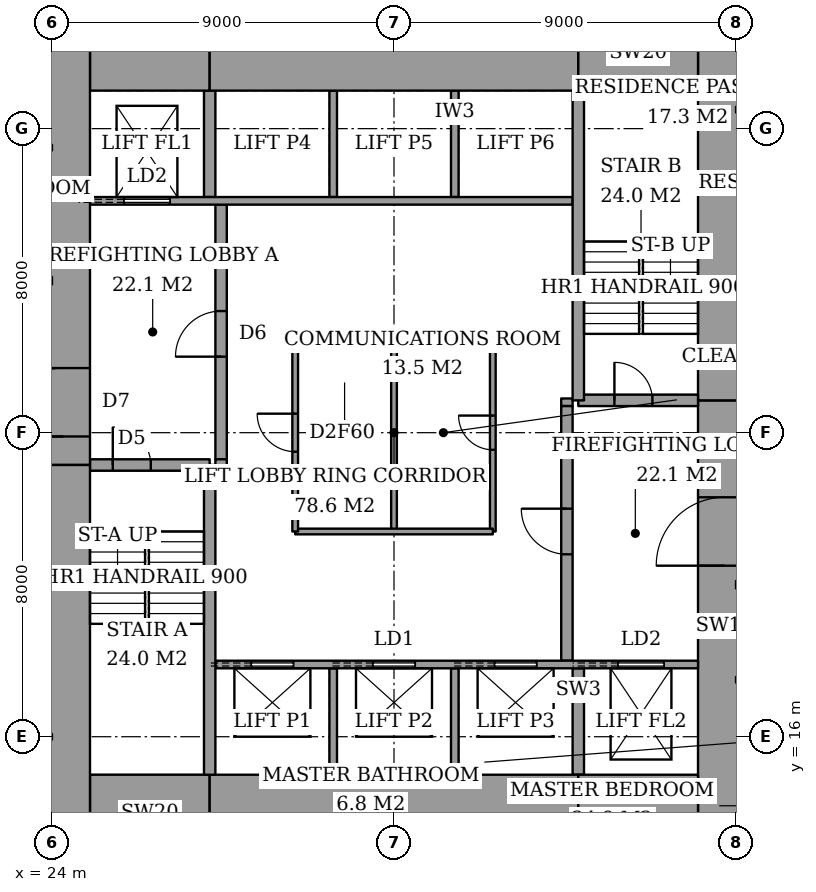
"""IFC4 building model, lengths in metres.
Left out: names, types, materials, properties, quantities, classifications, styles, units other than length and angle.
Written with IfcOpenShell. Run it as: python <this file> out.ifc"""

import sys

from ifc_helpers import new_model, si_unit, direction, frame, frame_2d, origin, place, context, subcontext, project, spatial, rectangle, extrude, element, fill, save


model = new_model("IFC4")
c1 = context("Model", 3, precision=1e-05, world=origin(), true_north=direction((0.0, 1.0)))
c2 = subcontext(c1, "Body", "Model", "MODEL_VIEW")
j1 = project(units=[si_unit("LENGTHUNIT", "METRE"), si_unit("PLANEANGLEUNIT", "RADIAN")], contexts=[c1])
p1 = place(None, origin())
s1 = spatial("IfcSite", under=j1, at=p1, CompositionType="ELEMENT")
p2 = place(p1, origin())
s2 = spatial("IfcBuilding", under=s1, at=p2, CompositionType="ELEMENT")
p3 = place(p2, frame((0.0, 0.0, 125.0)))
s3 = spatial("IfcBuildingStorey", under=s2, at=p3, CompositionType="ELEMENT", Elevation=125.0)
p4 = place(p3, frame((25.0, 14.0, 0.0), z_axis=(0.0, 0.0, 1.0), x_axis=(1.0, 0.0, 0.0)))
e1 = element("IfcWall", 1, at=p4, inside=s3, PredefinedType="SHEAR", context=c2, shape_type="SweptSolid", body=[
    extrude(rectangle(XDim=3.15, YDim=2.0, at=frame_2d((1.575, 0.0))), origin(), (0.0, 0.0, 1.0), 3.6),
])
p5 = place(p3, frame((28.15, 14.0, 0.0), z_axis=(0.0, 0.0, 1.0), x_axis=(1.0, 0.0, 0.0)))
e2 = element("IfcWall", 2, at=p5, inside=s3, PredefinedType="SHEAR", context=c2, shape_type="SweptSolid", body=[
    extrude(rectangle(XDim=9.7, YDim=2.0, at=frame_2d((4.85, 0.0))), origin(), (0.0, 0.0, 1.0), 3.6),
])
for number, where, z_axis, x_axis in (
    (3, (37.85, 14.0, 0.0), (0.0, 0.0, 1.0), (1.0, 0.0, 0.0)),
    (4, (25.0, 34.0, 0.0), (0.0, 0.0, 1.0), (1.0, 0.0, 0.0)),
):
    element("IfcWall", number, at=place(p3, frame(where, z_axis=z_axis, x_axis=x_axis)), inside=s3, PredefinedType="SHEAR", context=c2, shape_type="SweptSolid", body=[
        extrude(rectangle(XDim=3.15, YDim=2.0, at=frame_2d((1.575, 0.0))), origin(), (0.0, 0.0, 1.0), 3.6),
    ])
p6 = place(p3, frame((28.15, 34.0, 0.0), z_axis=(0.0, 0.0, 1.0), x_axis=(1.0, 0.0, 0.0)))
e5 = element("IfcWall", 5, at=p6, inside=s3, PredefinedType="SHEAR", context=c2, shape_type="SweptSolid", body=[
    extrude(rectangle(XDim=9.7, YDim=2.0, at=frame_2d((4.85, 0.0))), origin(), (0.0, 0.0, 1.0), 3.6),
])
p7 = place(p3, frame((37.85, 34.0, 0.0), z_axis=(0.0, 0.0, 1.0), x_axis=(1.0, 0.0, 0.0)))
e6 = element("IfcWall", 6, at=p7, inside=s3, PredefinedType="SHEAR", context=c2, shape_type="SweptSolid", body=[
    extrude(rectangle(XDim=3.15, YDim=2.0, at=frame_2d((1.575, 0.0))), origin(), (0.0, 0.0, 1.0), 3.6),
])
p8 = place(p3, frame((24.3, 13.0, 0.0), z_axis=(0.0, 0.0, 1.0), x_axis=(0.0, 1.0, 0.0)))
e7 = element("IfcWall", 7, at=p8, inside=s3, PredefinedType="SHEAR", context=c2, shape_type="SweptSolid", body=[
    extrude(rectangle(XDim=10.15, YDim=1.4, at=frame_2d((5.075, 0.0))), origin(), (0.0, 0.0, 1.0), 3.6),
])
p9 = place(p3, frame((24.3, 23.15, 0.0), z_axis=(0.0, 0.0, 1.0), x_axis=(0.0, 1.0, 0.0)))
e8 = element("IfcWall", 8, at=p9, inside=s3, PredefinedType="SHEAR", context=c2, shape_type="SweptSolid", body=[
    extrude(rectangle(XDim=11.85, YDim=1.4, at=frame_2d((5.925, 0.0))), origin(), (0.0, 0.0, 1.0), 3.6),
])
p10 = place(p9, frame((0.75, 0.0, 0.0)))
e9 = element("IfcOpeningElement", 9, at=p10, cuts=e8, PredefinedType="OPENING", context=c2, shape_type="SweptSolid", body=[
    extrude(rectangle(XDim=1.8, YDim=2.4, at=frame_2d((0.9, 1.2))), frame((0.0, 0.71, 0.0), z_axis=(0.0, -1.0, 0.0), x_axis=(1.0, 0.0, 0.0)), (0.0, 0.0, 1.0), 1.42),
])
p11 = place(p3, frame((41.7, 13.0, 0.0), z_axis=(0.0, 0.0, 1.0), x_axis=(0.0, 1.0, 0.0)))
e10 = element("IfcWall", 10, at=p11, inside=s3, PredefinedType="SHEAR", context=c2, shape_type="SweptSolid", body=[
    extrude(rectangle(XDim=11.85, YDim=1.4, at=frame_2d((5.925, 0.0))), origin(), (0.0, 0.0, 1.0), 3.6),
])
p12 = place(p11, frame((7.5, 0.0, 0.0)))
e11 = element("IfcOpeningElement", 11, at=p12, cuts=e10, PredefinedType="OPENING", context=c2, shape_type="SweptSolid", body=[
    extrude(rectangle(XDim=1.8, YDim=2.4, at=frame_2d((0.9, 1.2))), frame((0.0, 0.71, 0.0), z_axis=(0.0, -1.0, 0.0), x_axis=(1.0, 0.0, 0.0)), (0.0, 0.0, 1.0), 1.42),
])
p13 = place(p3, frame((41.7, 24.85, 0.0), z_axis=(0.0, 0.0, 1.0), x_axis=(0.0, 1.0, 0.0)))
e12 = element("IfcWall", 12, at=p13, inside=s3, PredefinedType="SHEAR", context=c2, shape_type="SweptSolid", body=[
    extrude(rectangle(XDim=10.15, YDim=1.4, at=frame_2d((5.075, 0.0))), origin(), (0.0, 0.0, 1.0), 3.6),
])
p14 = place(p3, frame((28.15, 15.0, 0.0), z_axis=(0.0, 0.0, 1.0), x_axis=(0.0, 1.0, 0.0)))
e13 = element("IfcWall", 13, at=p14, inside=s3, PredefinedType="SHEAR", context=c2, shape_type="SweptSolid", body=[
    extrude(rectangle(XDim=8.15, YDim=0.3, at=frame_2d((4.075, 0.0))), origin(), (0.0, 0.0, 1.0), 3.6),
])
p15 = place(p3, frame((25.0, 23.15, 0.0), z_axis=(0.0, 0.0, 1.0), x_axis=(1.0, 0.0, 0.0)))
e14 = element("IfcWall", 14, at=p15, inside=s3, PredefinedType="SHEAR", context=c2, shape_type="SweptSolid", body=[
    extrude(rectangle(XDim=3.15, YDim=0.3, at=frame_2d((1.575, 0.0))), origin(), (0.0, 0.0, 1.0), 3.6),
])
p16 = place(p15, frame((0.6, 0.0, 0.0)))
e15 = element("IfcOpeningElement", 15, at=p16, cuts=e14, PredefinedType="OPENING", context=c2, shape_type="SweptSolid", body=[
    extrude(rectangle(XDim=1.0, YDim=2.1, at=frame_2d((0.5, 1.05))), frame((0.0, 0.16, 0.0), z_axis=(0.0, -1.0, 0.0), x_axis=(1.0, 0.0, 0.0)), (0.0, 0.0, 1.0), 0.32),
])
p17 = place(p3, frame((37.85, 24.85, 0.0), z_axis=(0.0, 0.0, 1.0), x_axis=(0.0, 1.0, 0.0)))
e16 = element("IfcWall", 16, at=p17, inside=s3, PredefinedType="SHEAR", context=c2, shape_type="SweptSolid", body=[
    extrude(rectangle(XDim=8.15, YDim=0.3, at=frame_2d((4.075, 0.0))), origin(), (0.0, 0.0, 1.0), 3.6),
])
p18 = place(p3, frame((37.85, 24.85, 0.0), z_axis=(0.0, 0.0, 1.0), x_axis=(1.0, 0.0, 0.0)))
e17 = element("IfcWall", 17, at=p18, inside=s3, PredefinedType="SHEAR", context=c2, shape_type="SweptSolid", body=[
    extrude(rectangle(XDim=3.15, YDim=0.3, at=frame_2d((1.575, 0.0))), origin(), (0.0, 0.0, 1.0), 3.6),
])
p19 = place(p18, frame((0.95, 0.0, 0.0)))
e18 = element("IfcOpeningElement", 18, at=p19, cuts=e17, PredefinedType="OPENING", context=c2, shape_type="SweptSolid", body=[
    extrude(rectangle(XDim=1.0, YDim=2.1, at=frame_2d((0.5, 1.05))), frame((0.0, 0.16, 0.0), z_axis=(0.0, -1.0, 0.0), x_axis=(1.0, 0.0, 0.0)), (0.0, 0.0, 1.0), 0.32),
])
p20 = place(p3, frame((28.45, 23.3, 0.0), z_axis=(0.0, 0.0, 1.0), x_axis=(0.0, 1.0, 0.0)))
e19 = element("IfcWall", 19, at=p20, inside=s3, PredefinedType="PARTITIONING", context=c2, shape_type="SweptSolid", body=[
    extrude(rectangle(XDim=6.7, YDim=0.3, at=frame_2d((3.35, 0.0))), origin(), (0.0, 0.0, 1.0), 3.6),
])
p21 = place(p20, frame((2.7, 0.0, 0.0)))
e20 = element("IfcOpeningElement", 20, at=p21, cuts=e19, PredefinedType="OPENING", context=c2, shape_type="SweptSolid", body=[
    extrude(rectangle(XDim=1.2, YDim=2.1, at=frame_2d((0.6, 1.05))), frame((0.0, 0.16, 0.0), z_axis=(0.0, -1.0, 0.0), x_axis=(1.0, 0.0, 0.0)), (0.0, 0.0, 1.0), 0.32),
])
p22 = place(p3, frame((37.55, 18.0, 0.0), z_axis=(0.0, 0.0, 1.0), x_axis=(0.0, 1.0, 0.0)))
e21 = element("IfcWall", 21, at=p22, inside=s3, PredefinedType="PARTITIONING", context=c2, shape_type="SweptSolid", body=[
    extrude(rectangle(XDim=6.7, YDim=0.3, at=frame_2d((3.35, 0.0))), origin(), (0.0, 0.0, 1.0), 3.6),
])
p23 = place(p22, frame((2.8, 0.0, 0.0)))
e22 = element("IfcOpeningElement", 22, at=p23, cuts=e21, PredefinedType="OPENING", context=c2, shape_type="SweptSolid", body=[
    extrude(rectangle(XDim=1.2, YDim=2.1, at=frame_2d((0.6, 1.05))), frame((0.0, 0.16, 0.0), z_axis=(0.0, -1.0, 0.0), x_axis=(1.0, 0.0, 0.0)), (0.0, 0.0, 1.0), 0.32),
])
p24 = place(p3, frame((28.3, 17.9, 0.0), z_axis=(0.0, 0.0, 1.0), x_axis=(1.0, 0.0, 0.0)))
e23 = element("IfcWall", 23, at=p24, inside=s3, PredefinedType="PARTITIONING", context=c2, shape_type="SweptSolid", body=[
    extrude(rectangle(XDim=12.7, YDim=0.2, at=frame_2d((6.35, 0.0))), origin(), (0.0, 0.0, 1.0), 3.6),
])
p25 = place(p24, frame((0.95, 0.0, 0.0)))
e24 = element("IfcOpeningElement", 24, at=p25, cuts=e23, PredefinedType="OPENING", context=c2, shape_type="SweptSolid", body=[
    extrude(rectangle(XDim=1.1, YDim=2.1, at=frame_2d((0.55, 1.05))), frame((0.0, 0.11, 0.0), z_axis=(0.0, -1.0, 0.0), x_axis=(1.0, 0.0, 0.0)), (0.0, 0.0, 1.0), 0.22),
])
p26 = place(p24, frame((4.15, 0.0, 0.0)))
e25 = element("IfcOpeningElement", 25, at=p26, cuts=e23, PredefinedType="OPENING", context=c2, shape_type="SweptSolid", body=[
    extrude(rectangle(XDim=1.1, YDim=2.1, at=frame_2d((0.55, 1.05))), frame((0.0, 0.11, 0.0), z_axis=(0.0, -1.0, 0.0), x_axis=(1.0, 0.0, 0.0)), (0.0, 0.0, 1.0), 0.22),
])
p27 = place(p24, frame((7.35, 0.0, 0.0)))
e26 = element("IfcOpeningElement", 26, at=p27, cuts=e23, PredefinedType="OPENING", context=c2, shape_type="SweptSolid", body=[
    extrude(rectangle(XDim=1.1, YDim=2.1, at=frame_2d((0.55, 1.05))), frame((0.0, 0.11, 0.0), z_axis=(0.0, -1.0, 0.0), x_axis=(1.0, 0.0, 0.0)), (0.0, 0.0, 1.0), 0.22),
])
p28 = place(p24, frame((10.6, 0.0, 0.0)))
e27 = element("IfcOpeningElement", 27, at=p28, cuts=e23, PredefinedType="OPENING", context=c2, shape_type="SweptSolid", body=[
    extrude(rectangle(XDim=1.2, YDim=2.1, at=frame_2d((0.6, 1.05))), frame((0.0, 0.11, 0.0), z_axis=(0.0, -1.0, 0.0), x_axis=(1.0, 0.0, 0.0)), (0.0, 0.0, 1.0), 0.22),
])
p29 = place(p3, frame((25.0, 30.1, 0.0), z_axis=(0.0, 0.0, 1.0), x_axis=(1.0, 0.0, 0.0)))
e28 = element("IfcWall", 28, at=p29, inside=s3, PredefinedType="PARTITIONING", context=c2, shape_type="SweptSolid", body=[
    extrude(rectangle(XDim=12.7, YDim=0.2, at=frame_2d((6.35, 0.0))), origin(), (0.0, 0.0, 1.0), 3.6),
])
p30 = place(p29, frame((0.9, 0.0, 0.0)))
e29 = element("IfcOpeningElement", 29, at=p30, cuts=e28, PredefinedType="OPENING", context=c2, shape_type="SweptSolid", body=[
    extrude(rectangle(XDim=1.2, YDim=2.1, at=frame_2d((0.6, 1.05))), frame((0.0, 0.11, 0.0), z_axis=(0.0, -1.0, 0.0), x_axis=(1.0, 0.0, 0.0)), (0.0, 0.0, 1.0), 0.22),
])
for number, where, z_axis, x_axis in (
    (30, (31.4, 15.0, 0.0), (0.0, 0.0, 1.0), (0.0, 1.0, 0.0)),
    (31, (34.6, 15.0, 0.0), (0.0, 0.0, 1.0), (0.0, 1.0, 0.0)),
):
    element("IfcWall", number, at=place(p3, frame(where, z_axis=z_axis, x_axis=x_axis)), inside=s3, PredefinedType="PARTITIONING", context=c2, shape_type="SweptSolid", body=[
        extrude(rectangle(XDim=2.8, YDim=0.2, at=frame_2d((1.4, 0.0))), origin(), (0.0, 0.0, 1.0), 3.6),
    ])
p31 = place(p3, frame((37.85, 15.0, 0.0), z_axis=(0.0, 0.0, 1.0), x_axis=(0.0, 1.0, 0.0)))
e32 = element("IfcWall", 32, at=p31, inside=s3, PredefinedType="SHEAR", context=c2, shape_type="SweptSolid", body=[
    extrude(rectangle(XDim=2.8, YDim=0.3, at=frame_2d((1.4, 0.0))), origin(), (0.0, 0.0, 1.0), 3.6),
])
for number, where, z_axis, x_axis in (
    (33, (31.4, 30.2, 0.0), (0.0, 0.0, 1.0), (0.0, 1.0, 0.0)),
    (34, (34.6, 30.2, 0.0), (0.0, 0.0, 1.0), (0.0, 1.0, 0.0)),
):
    element("IfcWall", number, at=place(p3, frame(where, z_axis=z_axis, x_axis=x_axis)), inside=s3, PredefinedType="PARTITIONING", context=c2, shape_type="SweptSolid", body=[
        extrude(rectangle(XDim=2.8, YDim=0.2, at=frame_2d((1.4, 0.0))), origin(), (0.0, 0.0, 1.0), 3.6),
    ])
p32 = place(p3, frame((28.15, 30.2, 0.0), z_axis=(0.0, 0.0, 1.0), x_axis=(0.0, 1.0, 0.0)))
e35 = element("IfcWall", 35, at=p32, inside=s3, PredefinedType="SHEAR", context=c2, shape_type="SweptSolid", body=[
    extrude(rectangle(XDim=2.8, YDim=0.3, at=frame_2d((1.4, 0.0))), origin(), (0.0, 0.0, 1.0), 3.6),
])
for number, where, z_axis, x_axis in (
    (36, (28.3, 23.2, 0.0), (0.0, 0.0, 1.0), (1.0, 0.0, 0.0)),
    (37, (37.4, 24.8, 0.0), (0.0, 0.0, 1.0), (1.0, 0.0, 0.0)),
):
    element("IfcWall", number, at=place(p3, frame(where, z_axis=z_axis, x_axis=x_axis)), inside=s3, PredefinedType="PARTITIONING", context=c2, shape_type="SweptSolid", body=[
        extrude(rectangle(XDim=0.3, YDim=0.2, at=frame_2d((0.15, 0.0))), origin(), (0.0, 0.0, 1.0), 3.6),
    ])
for number, where, z_axis, x_axis in (
    (38, (30.4, 21.4, 0.0), (0.0, 0.0, 1.0), (1.0, 0.0, 0.0)),
    (39, (30.4, 26.6, 0.0), (0.0, 0.0, 1.0), (1.0, 0.0, 0.0)),
):
    element("IfcWall", number, at=place(p3, frame(where, z_axis=z_axis, x_axis=x_axis)), inside=s3, PredefinedType="PARTITIONING", context=c2, shape_type="SweptSolid", body=[
        extrude(rectangle(XDim=5.2, YDim=0.15, at=frame_2d((2.6, 0.0))), origin(), (0.0, 0.0, 1.0), 3.35),
    ])
p33 = place(p3, frame((30.4, 21.4, 0.0), z_axis=(0.0, 0.0, 1.0), x_axis=(0.0, 1.0, 0.0)))
e40 = element("IfcWall", 40, at=p33, inside=s3, PredefinedType="PARTITIONING", context=c2, shape_type="SweptSolid", body=[
    extrude(rectangle(XDim=5.2, YDim=0.15, at=frame_2d((2.6, 0.0))), origin(), (0.0, 0.0, 1.0), 3.35),
])
p34 = place(p33, frame((2.1, 0.0, 0.0)))
e41 = element("IfcOpeningElement", 41, at=p34, cuts=e40, PredefinedType="OPENING", context=c2, shape_type="SweptSolid", body=[
    extrude(rectangle(XDim=1.0, YDim=2.1, at=frame_2d((0.5, 1.05))), frame((0.0, 0.085, 0.0), z_axis=(0.0, -1.0, 0.0), x_axis=(1.0, 0.0, 0.0)), (0.0, 0.0, 1.0), 0.17),
])
p35 = place(p3, frame((35.6, 21.4, 0.0), z_axis=(0.0, 0.0, 1.0), x_axis=(0.0, 1.0, 0.0)))
e42 = element("IfcWall", 42, at=p35, inside=s3, PredefinedType="PARTITIONING", context=c2, shape_type="SweptSolid", body=[
    extrude(rectangle(XDim=5.2, YDim=0.15, at=frame_2d((2.6, 0.0))), origin(), (0.0, 0.0, 1.0), 3.35),
])
p36 = place(p35, frame((2.15, 0.0, 0.0)))
e43 = element("IfcOpeningElement", 43, at=p36, cuts=e42, PredefinedType="OPENING", context=c2, shape_type="SweptSolid", body=[
    extrude(rectangle(XDim=0.9, YDim=2.1, at=frame_2d((0.45, 1.05))), frame((0.0, 0.085, 0.0), z_axis=(0.0, -1.0, 0.0), x_axis=(1.0, 0.0, 0.0)), (0.0, 0.0, 1.0), 0.17),
])
p37 = place(p3, frame((33.0, 21.4, 0.0), z_axis=(0.0, 0.0, 1.0), x_axis=(0.0, 1.0, 0.0)))
e44 = element("IfcWall", 44, at=p37, inside=s3, PredefinedType="PARTITIONING", context=c2, shape_type="SweptSolid", body=[
    extrude(rectangle(XDim=5.2, YDim=0.15, at=frame_2d((2.6, 0.0))), origin(), (0.0, 0.0, 1.0), 3.35),
])
p38 = place(p16, origin())
e45 = element("IfcDoor", 45, at=p38, inside=s3, OperationType="SINGLE_SWING_RIGHT", PredefinedType="DOOR", context=c2, shape_type="SweptSolid", body=[
    extrude(rectangle(XDim=1.0, YDim=2.1, at=frame_2d((0.5, 1.05))), frame((0.0, 0.025, 0.0), z_axis=(0.0, -1.0, 0.0), x_axis=(1.0, 0.0, 0.0)), (0.0, 0.0, 1.0), 0.05),
])
fill(e15, e45)
p39 = place(p19, origin())
e46 = element("IfcDoor", 46, at=p39, inside=s3, OperationType="SINGLE_SWING_RIGHT", PredefinedType="DOOR", context=c2, shape_type="SweptSolid", body=[
    extrude(rectangle(XDim=1.0, YDim=2.1, at=frame_2d((0.5, 1.05))), frame((0.0, 0.025, 0.0), z_axis=(0.0, -1.0, 0.0), x_axis=(1.0, 0.0, 0.0)), (0.0, 0.0, 1.0), 0.05),
])
fill(e18, e46)
p40 = place(p21, origin())
e47 = element("IfcDoor", 47, at=p40, inside=s3, OperationType="SINGLE_SWING_RIGHT", PredefinedType="DOOR", context=c2, shape_type="SweptSolid", body=[
    extrude(rectangle(XDim=1.2, YDim=2.1, at=frame_2d((0.6, 1.05))), frame((0.0, 0.025, 0.0), z_axis=(0.0, -1.0, 0.0), x_axis=(1.0, 0.0, 0.0)), (0.0, 0.0, 1.0), 0.05),
])
fill(e20, e47)
p41 = place(p23, origin())
e48 = element("IfcDoor", 48, at=p41, inside=s3, OperationType="SINGLE_SWING_LEFT", PredefinedType="DOOR", context=c2, shape_type="SweptSolid", body=[
    extrude(rectangle(XDim=1.2, YDim=2.1, at=frame_2d((0.6, 1.05))), frame((0.0, 0.025, 0.0), z_axis=(0.0, -1.0, 0.0), x_axis=(1.0, 0.0, 0.0)), (0.0, 0.0, 1.0), 0.05),
])
fill(e22, e48)
p42 = place(p10, origin())
e49 = element("IfcDoor", 49, at=p42, inside=s3, OperationType="DOUBLE_DOOR_DOUBLE_SWING", PredefinedType="DOOR", context=c2, shape_type="SweptSolid", body=[
    extrude(rectangle(XDim=1.8, YDim=2.4, at=frame_2d((0.9, 1.2))), frame((0.0, 0.025, 0.0), z_axis=(0.0, -1.0, 0.0), x_axis=(1.0, 0.0, 0.0)), (0.0, 0.0, 1.0), 0.05),
])
fill(e9, e49)
p43 = place(p12, origin())
e50 = element("IfcDoor", 50, at=p43, inside=s3, OperationType="DOUBLE_DOOR_DOUBLE_SWING", PredefinedType="DOOR", context=c2, shape_type="SweptSolid", body=[
    extrude(rectangle(XDim=1.8, YDim=2.4, at=frame_2d((0.9, 1.2))), frame((0.0, 0.025, 0.0), z_axis=(0.0, -1.0, 0.0), x_axis=(1.0, 0.0, 0.0)), (0.0, 0.0, 1.0), 0.05),
])
fill(e11, e50)
p44 = place(p34, origin())
e51 = element("IfcDoor", 51, at=p44, inside=s3, OperationType="SINGLE_SWING_LEFT", PredefinedType="DOOR", context=c2, shape_type="SweptSolid", body=[
    extrude(rectangle(XDim=1.0, YDim=2.1, at=frame_2d((0.5, 1.05))), frame((0.0, 0.025, 0.0), z_axis=(0.0, -1.0, 0.0), x_axis=(1.0, 0.0, 0.0)), (0.0, 0.0, 1.0), 0.05),
])
fill(e41, e51)
p45 = place(p36, origin())
e52 = element("IfcDoor", 52, at=p45, inside=s3, OperationType="SINGLE_SWING_LEFT", PredefinedType="DOOR", context=c2, shape_type="SweptSolid", body=[
    extrude(rectangle(XDim=0.9, YDim=2.1, at=frame_2d((0.45, 1.05))), frame((0.0, 0.025, 0.0), z_axis=(0.0, -1.0, 0.0), x_axis=(1.0, 0.0, 0.0)), (0.0, 0.0, 1.0), 0.05),
])
fill(e43, e52)
p46 = place(p25, origin())
e53 = element("IfcDoor", 53, at=p46, inside=s3, OperationType="SLIDING_TO_LEFT", PredefinedType="DOOR", context=c2, shape_type="SweptSolid", body=[
    extrude(rectangle(XDim=1.1, YDim=2.1, at=frame_2d((0.55, 1.05))), frame((0.0, 0.025, 0.0), z_axis=(0.0, -1.0, 0.0), x_axis=(1.0, 0.0, 0.0)), (0.0, 0.0, 1.0), 0.05),
])
fill(e24, e53)
p47 = place(p26, origin())
e54 = element("IfcDoor", 54, at=p47, inside=s3, OperationType="SLIDING_TO_LEFT", PredefinedType="DOOR", context=c2, shape_type="SweptSolid", body=[
    extrude(rectangle(XDim=1.1, YDim=2.1, at=frame_2d((0.55, 1.05))), frame((0.0, 0.025, 0.0), z_axis=(0.0, -1.0, 0.0), x_axis=(1.0, 0.0, 0.0)), (0.0, 0.0, 1.0), 0.05),
])
fill(e25, e54)
p48 = place(p27, origin())
e55 = element("IfcDoor", 55, at=p48, inside=s3, OperationType="SLIDING_TO_LEFT", PredefinedType="DOOR", context=c2, shape_type="SweptSolid", body=[
    extrude(rectangle(XDim=1.1, YDim=2.1, at=frame_2d((0.55, 1.05))), frame((0.0, 0.025, 0.0), z_axis=(0.0, -1.0, 0.0), x_axis=(1.0, 0.0, 0.0)), (0.0, 0.0, 1.0), 0.05),
])
fill(e26, e55)
p49 = place(p30, origin())
e56 = element("IfcDoor", 56, at=p49, inside=s3, OperationType="SLIDING_TO_LEFT", PredefinedType="DOOR", context=c2, shape_type="SweptSolid", body=[
    extrude(rectangle(XDim=1.2, YDim=2.1, at=frame_2d((0.6, 1.05))), frame((0.0, 0.025, 0.0), z_axis=(0.0, -1.0, 0.0), x_axis=(1.0, 0.0, 0.0)), (0.0, 0.0, 1.0), 0.05),
])
fill(e29, e56)
p50 = place(p28, origin())
e57 = element("IfcDoor", 57, at=p50, inside=s3, OperationType="SLIDING_TO_LEFT", PredefinedType="DOOR", context=c2, shape_type="SweptSolid", body=[
    extrude(rectangle(XDim=1.2, YDim=2.1, at=frame_2d((0.6, 1.05))), frame((0.0, 0.025, 0.0), z_axis=(0.0, -1.0, 0.0), x_axis=(1.0, 0.0, 0.0)), (0.0, 0.0, 1.0), 0.05),
])
fill(e27, e57)
save(model, sys.argv[1])
